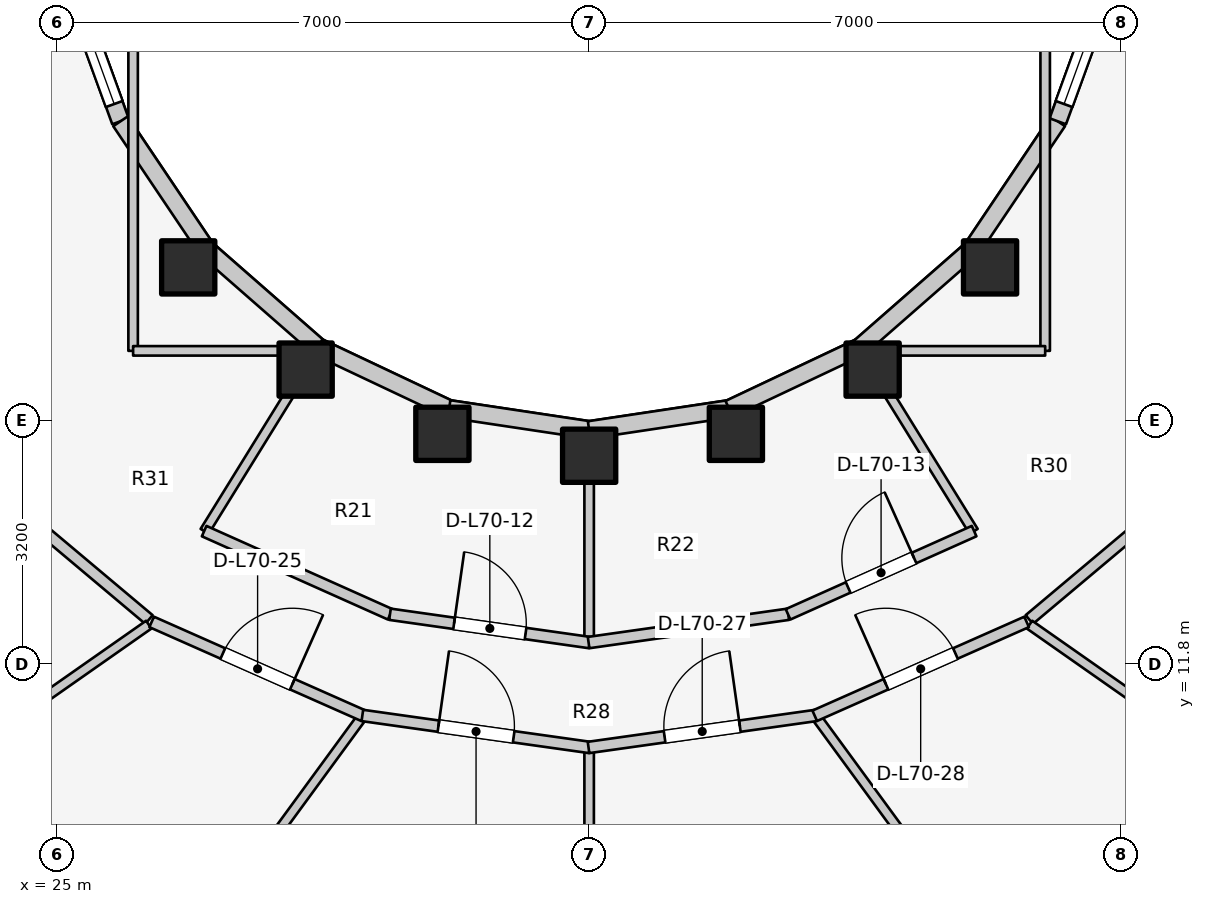
"""IFC4 building model, lengths in metres.
Left out: names, types, materials, properties, quantities, classifications, styles, units other than length and angle.
Written with IfcOpenShell. Run it as: python <this file> out.ifc"""

import sys

from ifc_helpers import new_model, si_unit, direction, frame, frame_2d, origin, origin_2d, place, context, subcontext, project, spatial, rectangle, extrude, element, fill, save


model = new_model("IFC4")
c1 = context("Model", 3, precision=1e-05, world=origin(), true_north=direction((0.0, 1.0)))
c2 = subcontext(c1, "Body", "Model", "MODEL_VIEW")
j1 = project(units=[si_unit("LENGTHUNIT", "METRE"), si_unit("PLANEANGLEUNIT", "RADIAN")], contexts=[c1])
p1 = place(None, origin())
s1 = spatial("IfcSite", under=j1, at=p1, CompositionType="ELEMENT")
p2 = place(p1, origin())
s2 = spatial("IfcBuilding", under=s1, at=p2, CompositionType="ELEMENT")
p3 = place(p2, frame((0.0, 0.0, 229.5)))
s3 = spatial("IfcBuildingStorey", under=s2, at=p3, CompositionType="ELEMENT", Elevation=229.5)
for number, where, z_axis, x_axis in (
    (1, (26.725, 17.018, 0.0), (0.0, 0.0, 1.0), (1.0, 0.0, 0.0)),
    (2, (28.27, 15.673, 0.0), (0.0, 0.0, 1.0), (1.0, 0.0, 0.0)),
    (3, (30.069, 14.828, 0.0), (0.0, 0.0, 1.0), (1.0, 0.0, 0.0)),
    (4, (32.0, 14.54, 0.0), (0.0, 0.0, 1.0), (1.0, 0.0, 0.0)),
    (5, (33.931, 14.828, 0.0), (0.0, 0.0, 1.0), (1.0, 0.0, 0.0)),
    (6, (35.73, 15.673, 0.0), (0.0, 0.0, 1.0), (1.0, 0.0, 0.0)),
    (7, (37.275, 17.018, 0.0), (0.0, 0.0, 1.0), (1.0, 0.0, 0.0)),
):
    element("IfcColumn", number, at=place(p3, frame(where, z_axis=z_axis, x_axis=x_axis)), inside=s3, PredefinedType="COLUMN", context=c2, shape_type="SweptSolid", body=[
        extrude(rectangle(XDim=0.7, YDim=0.7, at=origin_2d()), origin(), (0.0, 0.0, 1.0), 3.1),
    ])
p4 = place(p3, frame((25.123, 20.898, 0.0), z_axis=(0.0, 0.0, 1.0), x_axis=(0.341423187295, -0.93990968033, 0.0)))
e8 = element("IfcWall", 8, at=p4, inside=s3, PredefinedType="STANDARD", context=c2, shape_type="SweptSolid", body=[
    extrude(rectangle(XDim=2.084, YDim=0.23, at=frame_2d((1.042, 0.0))), origin(), (0.0, 0.0, 1.0), 2.84),
])
p5 = place(p4, frame((0.242, 0.0, 0.85)))
e9 = element("IfcOpeningElement", 9, at=p5, cuts=e8, PredefinedType="OPENING", context=c2, shape_type="SweptSolid", body=[
    extrude(rectangle(XDim=1.6, YDim=1.65, at=frame_2d((0.8, 0.825))), frame((0.0, 0.125, 0.0), z_axis=(0.0, -1.0, 0.0), x_axis=(1.0, 0.0, 0.0)), (0.0, 0.0, 1.0), 0.25),
])
p6 = place(p3, frame((25.834, 18.94, 0.0), z_axis=(0.0, 0.0, 1.0), x_axis=(0.558197800898, -0.829707909492, 0.0)))
e10 = element("IfcWall", 10, at=p6, inside=s3, PredefinedType="STANDARD", context=c2, shape_type="SweptSolid", body=[
    extrude(rectangle(XDim=2.027, YDim=0.23, at=frame_2d((1.013, 0.0))), origin(), (0.0, 0.0, 1.0), 2.16),
])
p7 = place(p3, frame((26.965, 17.258, 0.0), z_axis=(0.0, 0.0, 1.0), x_axis=(0.752576694707, -0.658504607869, 0.0)))
e11 = element("IfcWall", 11, at=p7, inside=s3, PredefinedType="STANDARD", context=c2, shape_type="SweptSolid", body=[
    extrude(rectangle(XDim=1.959, YDim=0.23, at=frame_2d((0.98, 0.0))), origin(), (0.0, 0.0, 1.0), 2.16),
])
p8 = place(p3, frame((28.44, 15.968, 0.0), z_axis=(0.0, 0.0, 1.0), x_axis=(0.904179699603, -0.427152280606, 0.0)))
e12 = element("IfcWall", 12, at=p8, inside=s3, PredefinedType="STANDARD", context=c2, shape_type="SweptSolid", body=[
    extrude(rectangle(XDim=1.899, YDim=0.23, at=frame_2d((0.95, 0.0))), origin(), (0.0, 0.0, 1.0), 2.16),
])
for number, where, z_axis, x_axis in (
    (13, (30.157, 15.157, 0.0), (0.0, 0.0, 1.0), (0.989, -0.149, 0.0)),
    (14, (32.0, 14.88, 0.0), (0.0, 0.0, 1.0), (0.989, 0.149, 0.0)),
):
    element("IfcWall", number, at=place(p3, frame(where, z_axis=z_axis, x_axis=x_axis)), inside=s3, PredefinedType="STANDARD", context=c2, shape_type="SweptSolid", body=[
        extrude(rectangle(XDim=1.864, YDim=0.23, at=frame_2d((0.932, 0.0))), origin(), (0.0, 0.0, 1.0), 2.16),
    ])
p9 = place(p3, frame((33.843, 15.157, 0.0), z_axis=(0.0, 0.0, 1.0), x_axis=(0.904179699603, 0.427152280606, 0.0)))
e15 = element("IfcWall", 15, at=p9, inside=s3, PredefinedType="STANDARD", context=c2, shape_type="SweptSolid", body=[
    extrude(rectangle(XDim=1.899, YDim=0.23, at=frame_2d((0.95, 0.0))), origin(), (0.0, 0.0, 1.0), 2.16),
])
p10 = place(p3, frame((35.56, 15.968, 0.0), z_axis=(0.0, 0.0, 1.0), x_axis=(0.752576694707, 0.658504607869, 0.0)))
e16 = element("IfcWall", 16, at=p10, inside=s3, PredefinedType="STANDARD", context=c2, shape_type="SweptSolid", body=[
    extrude(rectangle(XDim=1.959, YDim=0.23, at=frame_2d((0.98, 0.0))), origin(), (0.0, 0.0, 1.0), 2.16),
])
p11 = place(p3, frame((37.035, 17.258, 0.0), z_axis=(0.0, 0.0, 1.0), x_axis=(0.558197800898, 0.829707909492, 0.0)))
e17 = element("IfcWall", 17, at=p11, inside=s3, PredefinedType="STANDARD", context=c2, shape_type="SweptSolid", body=[
    extrude(rectangle(XDim=2.027, YDim=0.23, at=frame_2d((1.013, 0.0))), origin(), (0.0, 0.0, 1.0), 2.16),
])
p12 = place(p3, frame((38.166, 18.94, 0.0), z_axis=(0.0, 0.0, 1.0), x_axis=(0.341423187295, 0.93990968033, 0.0)))
e18 = element("IfcWall", 18, at=p12, inside=s3, PredefinedType="STANDARD", context=c2, shape_type="SweptSolid", body=[
    extrude(rectangle(XDim=2.084, YDim=0.23, at=frame_2d((1.042, 0.0))), origin(), (0.0, 0.0, 1.0), 2.84),
])
p13 = place(p12, frame((0.242, 0.0, 0.85)))
e19 = element("IfcOpeningElement", 19, at=p13, cuts=e18, PredefinedType="OPENING", context=c2, shape_type="SweptSolid", body=[
    extrude(rectangle(XDim=1.6, YDim=1.65, at=frame_2d((0.8, 0.825))), frame((0.0, 0.125, 0.0), z_axis=(0.0, -1.0, 0.0), x_axis=(1.0, 0.0, 0.0)), (0.0, 0.0, 1.0), 0.25),
])
p14 = place(p3, frame((28.45, 15.985, 0.0), z_axis=(0.0, 0.0, 1.0), x_axis=(-0.52592395012, -0.850531597702, 0.0)))
e20 = element("IfcWall", 20, at=p14, inside=s3, PredefinedType="PARTITIONING", context=c2, shape_type="SweptSolid", body=[
    extrude(rectangle(XDim=2.869, YDim=0.125, at=frame_2d((1.435, 0.0))), origin(), (0.0, 0.0, 1.0), 2.376),
])
p15 = place(p3, frame((32.0, 14.9, 0.0), z_axis=(0.0, 0.0, 1.0), x_axis=(0.0, -1.0, 0.0)))
e21 = element("IfcWall", 21, at=p15, inside=s3, PredefinedType="PARTITIONING", context=c2, shape_type="SweptSolid", body=[
    extrude(rectangle(XDim=2.818, YDim=0.125, at=frame_2d((1.409, 0.0))), origin(), (0.0, 0.0, 1.0), 2.376),
])
p16 = place(p3, frame((35.55, 15.985, 0.0), z_axis=(0.0, 0.0, 1.0), x_axis=(0.52592395012, -0.850531597702, 0.0)))
e22 = element("IfcWall", 22, at=p16, inside=s3, PredefinedType="PARTITIONING", context=c2, shape_type="SweptSolid", body=[
    extrude(rectangle(XDim=2.869, YDim=0.125, at=frame_2d((1.435, 0.0))), origin(), (0.0, 0.0, 1.0), 2.376),
])
p17 = place(p3, frame((26.935, 13.549, 0.0), z_axis=(0.0, 0.0, 1.0), x_axis=(0.912859324183, -0.408274239027, 0.0)))
e23 = element("IfcWall", 23, at=p17, inside=s3, PredefinedType="PARTITIONING", context=c2, shape_type="SweptSolid", body=[
    extrude(rectangle(XDim=2.682, YDim=0.15, at=frame_2d((1.341, 0.0))), origin(), (0.0, 0.0, 1.0), 2.376),
])
p18 = place(p3, frame((29.38, 12.455, 0.0), z_axis=(0.0, 0.0, 1.0), x_axis=(0.990096156252, -0.140390887794, 0.0)))
e24 = element("IfcWall", 24, at=p18, inside=s3, PredefinedType="PARTITIONING", context=c2, shape_type="SweptSolid", body=[
    extrude(rectangle(XDim=2.654, YDim=0.15, at=frame_2d((1.327, 0.0))), origin(), (0.0, 0.0, 1.0), 2.376),
])
p19 = place(p18, frame((0.852, 0.0, 0.0)))
e25 = element("IfcOpeningElement", 25, at=p19, cuts=e24, PredefinedType="OPENING", context=c2, shape_type="SweptSolid", body=[
    extrude(rectangle(XDim=0.95, YDim=2.1, at=frame_2d((0.475, 1.05))), frame((0.0, 0.085, 0.0), z_axis=(0.0, -1.0, 0.0), x_axis=(1.0, 0.0, 0.0)), (0.0, 0.0, 1.0), 0.17),
])
p20 = place(p3, frame((31.993, 12.082, 0.0), z_axis=(0.0, 0.0, 1.0), x_axis=(0.990096156252, 0.140390887794, 0.0)))
e26 = element("IfcWall", 26, at=p20, inside=s3, PredefinedType="PARTITIONING", context=c2, shape_type="SweptSolid", body=[
    extrude(rectangle(XDim=2.654, YDim=0.15, at=frame_2d((1.327, 0.0))), origin(), (0.0, 0.0, 1.0), 2.376),
])
p21 = place(p3, frame((34.617, 12.454, 0.0), z_axis=(0.0, 0.0, 1.0), x_axis=(0.912859324183, 0.408274239027, 0.0)))
e27 = element("IfcWall", 27, at=p21, inside=s3, PredefinedType="PARTITIONING", context=c2, shape_type="SweptSolid", body=[
    extrude(rectangle(XDim=2.682, YDim=0.15, at=frame_2d((1.341, 0.0))), origin(), (0.0, 0.0, 1.0), 2.376),
])
p22 = place(p21, frame((0.866, 0.0, 0.0)))
e28 = element("IfcOpeningElement", 28, at=p22, cuts=e27, PredefinedType="OPENING", context=c2, shape_type="SweptSolid", body=[
    extrude(rectangle(XDim=0.95, YDim=2.1, at=frame_2d((0.475, 1.05))), frame((0.0, 0.085, 0.0), z_axis=(0.0, -1.0, 0.0), x_axis=(1.0, 0.0, 0.0)), (0.0, 0.0, 1.0), 0.17),
])
p23 = place(p3, frame((26.0, 15.92, 0.0), z_axis=(0.0, 0.0, 1.0), x_axis=(0.0, 1.0, 0.0)))
e29 = element("IfcWall", 29, at=p23, inside=s3, PredefinedType="PARTITIONING", context=c2, shape_type="SweptSolid", body=[
    extrude(rectangle(XDim=4.28, YDim=0.125, at=frame_2d((2.14, 0.0))), origin(), (0.0, 0.0, 1.0), 2.232),
])
p24 = place(p3, frame((26.0, 15.92, 0.0), z_axis=(0.0, 0.0, 1.0), x_axis=(1.0, 0.0, 0.0)))
e30 = element("IfcWall", 30, at=p24, inside=s3, PredefinedType="PARTITIONING", context=c2, shape_type="SweptSolid", body=[
    extrude(rectangle(XDim=2.6, YDim=0.125, at=frame_2d((1.3, 0.0))), origin(), (0.0, 0.0, 1.0), 2.232),
])
p25 = place(p3, frame((38.0, 15.92, 0.0), z_axis=(0.0, 0.0, 1.0), x_axis=(0.0, 1.0, 0.0)))
e31 = element("IfcWall", 31, at=p25, inside=s3, PredefinedType="PARTITIONING", context=c2, shape_type="SweptSolid", body=[
    extrude(rectangle(XDim=4.28, YDim=0.125, at=frame_2d((2.14, 0.0))), origin(), (0.0, 0.0, 1.0), 2.232),
])
p26 = place(p3, frame((35.4, 15.92, 0.0), z_axis=(0.0, 0.0, 1.0), x_axis=(1.0, 0.0, 0.0)))
e32 = element("IfcWall", 32, at=p26, inside=s3, PredefinedType="PARTITIONING", context=c2, shape_type="SweptSolid", body=[
    extrude(rectangle(XDim=2.6, YDim=0.125, at=frame_2d((1.3, 0.0))), origin(), (0.0, 0.0, 1.0), 2.232),
])
for number, where, z_axis, x_axis in (
    (33, (26.209, 12.385, 0.0), (0.0, 0.0, 1.0), (-0.766, 0.643, 0.0)),
    (34, (37.791, 12.385, 0.0), (0.0, 0.0, 1.0), (0.766, 0.643, 0.0)),
):
    element("IfcWall", number, at=place(p3, frame(where, z_axis=z_axis, x_axis=x_axis)), inside=s3, PredefinedType="PARTITIONING", context=c2, shape_type="SweptSolid", body=[
        extrude(rectangle(XDim=2.105, YDim=0.15, at=frame_2d((1.053, 0.0))), origin(), (0.0, 0.0, 1.0), 2.376),
    ])
p27 = place(p3, frame((26.206, 12.318, 0.0), z_axis=(0.0, 0.0, 1.0), x_axis=(-0.819017716307, -0.573768228796, 0.0)))
e35 = element("IfcWall", 35, at=p27, inside=s3, PredefinedType="PARTITIONING", context=c2, shape_type="SweptSolid", body=[
    extrude(rectangle(XDim=6.802, YDim=0.125, at=frame_2d((3.401, 0.0))), origin(), (0.0, 0.0, 1.0), 2.376),
])
p28 = place(p3, frame((28.992, 11.077, 0.0), z_axis=(0.0, 0.0, 1.0), x_axis=(-0.590771495169, -0.806838918555, 0.0)))
e36 = element("IfcWall", 36, at=p28, inside=s3, PredefinedType="PARTITIONING", context=c2, shape_type="SweptSolid", body=[
    extrude(rectangle(XDim=6.347, YDim=0.125, at=frame_2d((3.173, 0.0))), origin(), (0.0, 0.0, 1.0), 2.376),
])
p29 = place(p3, frame((32.0, 10.647, 0.0), z_axis=(0.0, 0.0, 1.0), x_axis=(0.0, -1.0, 0.0)))
e37 = element("IfcWall", 37, at=p29, inside=s3, PredefinedType="PARTITIONING", context=c2, shape_type="SweptSolid", body=[
    extrude(rectangle(XDim=5.547, YDim=0.125, at=frame_2d((2.773, 0.0))), origin(), (0.0, 0.0, 1.0), 2.376),
])
p30 = place(p3, frame((35.008, 11.077, 0.0), z_axis=(0.0, 0.0, 1.0), x_axis=(0.590771495169, -0.806838918555, 0.0)))
e38 = element("IfcWall", 38, at=p30, inside=s3, PredefinedType="PARTITIONING", context=c2, shape_type="SweptSolid", body=[
    extrude(rectangle(XDim=6.347, YDim=0.125, at=frame_2d((3.173, 0.0))), origin(), (0.0, 0.0, 1.0), 2.376),
])
p31 = place(p3, frame((37.794, 12.318, 0.0), z_axis=(0.0, 0.0, 1.0), x_axis=(0.819017716307, -0.573768228796, 0.0)))
e39 = element("IfcWall", 39, at=p31, inside=s3, PredefinedType="PARTITIONING", context=c2, shape_type="SweptSolid", body=[
    extrude(rectangle(XDim=6.802, YDim=0.125, at=frame_2d((3.401, 0.0))), origin(), (0.0, 0.0, 1.0), 2.376),
])
p32 = place(p3, frame((26.244, 12.354, 0.0), z_axis=(0.0, 0.0, 1.0), x_axis=(0.914302802833, -0.405031337963, 0.0)))
e40 = element("IfcWall", 40, at=p32, inside=s3, PredefinedType="PARTITIONING", context=c2, shape_type="SweptSolid", body=[
    extrude(rectangle(XDim=3.049, YDim=0.15, at=frame_2d((1.525, 0.0))), origin(), (0.0, 0.0, 1.0), 2.376),
])
p33 = place(p32, frame((1.025, 0.0, 0.0)))
e41 = element("IfcOpeningElement", 41, at=p33, cuts=e40, PredefinedType="OPENING", context=c2, shape_type="SweptSolid", body=[
    extrude(rectangle(XDim=1.0, YDim=2.1, at=frame_2d((0.5, 1.05))), frame((0.0, 0.085, 0.0), z_axis=(0.0, -1.0, 0.0), x_axis=(1.0, 0.0, 0.0)), (0.0, 0.0, 1.0), 0.17),
])
p34 = place(p3, frame((29.016, 11.123, 0.0), z_axis=(0.0, 0.0, 1.0), x_axis=(0.990225561979, -0.139475217886, 0.0)))
e42 = element("IfcWall", 42, at=p34, inside=s3, PredefinedType="PARTITIONING", context=c2, shape_type="SweptSolid", body=[
    extrude(rectangle(XDim=3.021, YDim=0.15, at=frame_2d((1.511, 0.0))), origin(), (0.0, 0.0, 1.0), 2.376),
])
p35 = place(p34, frame((1.01, 0.0, 0.0)))
e43 = element("IfcOpeningElement", 43, at=p35, cuts=e42, PredefinedType="OPENING", context=c2, shape_type="SweptSolid", body=[
    extrude(rectangle(XDim=1.0, YDim=2.1, at=frame_2d((0.5, 1.05))), frame((0.0, 0.085, 0.0), z_axis=(0.0, -1.0, 0.0), x_axis=(1.0, 0.0, 0.0)), (0.0, 0.0, 1.0), 0.17),
])
p36 = place(p3, frame((31.992, 10.702, 0.0), z_axis=(0.0, 0.0, 1.0), x_axis=(0.990225561979, 0.139475217886, 0.0)))
e44 = element("IfcWall", 44, at=p36, inside=s3, PredefinedType="PARTITIONING", context=c2, shape_type="SweptSolid", body=[
    extrude(rectangle(XDim=3.021, YDim=0.15, at=frame_2d((1.511, 0.0))), origin(), (0.0, 0.0, 1.0), 2.376),
])
p37 = place(p36, frame((1.01, 0.0, 0.0)))
e45 = element("IfcOpeningElement", 45, at=p37, cuts=e44, PredefinedType="OPENING", context=c2, shape_type="SweptSolid", body=[
    extrude(rectangle(XDim=1.0, YDim=2.1, at=frame_2d((0.5, 1.05))), frame((0.0, 0.085, 0.0), z_axis=(0.0, -1.0, 0.0), x_axis=(1.0, 0.0, 0.0)), (0.0, 0.0, 1.0), 0.17),
])
p38 = place(p3, frame((34.968, 11.119, 0.0), z_axis=(0.0, 0.0, 1.0), x_axis=(0.914302802833, 0.405031337963, 0.0)))
e46 = element("IfcWall", 46, at=p38, inside=s3, PredefinedType="PARTITIONING", context=c2, shape_type="SweptSolid", body=[
    extrude(rectangle(XDim=3.049, YDim=0.15, at=frame_2d((1.525, 0.0))), origin(), (0.0, 0.0, 1.0), 2.376),
])
p39 = place(p38, frame((1.025, 0.0, 0.0)))
e47 = element("IfcOpeningElement", 47, at=p39, cuts=e46, PredefinedType="OPENING", context=c2, shape_type="SweptSolid", body=[
    extrude(rectangle(XDim=1.0, YDim=2.1, at=frame_2d((0.5, 1.05))), frame((0.0, 0.085, 0.0), z_axis=(0.0, -1.0, 0.0), x_axis=(1.0, 0.0, 0.0)), (0.0, 0.0, 1.0), 0.17),
])
p40 = place(p5, origin())
e48 = element("IfcWindow", 48, at=p40, inside=s3, PartitioningType="SINGLE_PANEL", PredefinedType="WINDOW", context=c2, shape_type="SweptSolid", body=[
    extrude(rectangle(XDim=1.6, YDim=1.65, at=frame_2d((0.8, 0.825))), frame((0.0, 0.03, 0.0), z_axis=(0.0, -1.0, 0.0), x_axis=(1.0, 0.0, 0.0)), (0.0, 0.0, 1.0), 0.06),
])
fill(e9, e48)
p41 = place(p13, origin())
e49 = element("IfcWindow", 49, at=p41, inside=s3, PartitioningType="SINGLE_PANEL", PredefinedType="WINDOW", context=c2, shape_type="SweptSolid", body=[
    extrude(rectangle(XDim=1.6, YDim=1.65, at=frame_2d((0.8, 0.825))), frame((0.0, 0.03, 0.0), z_axis=(0.0, -1.0, 0.0), x_axis=(1.0, 0.0, 0.0)), (0.0, 0.0, 1.0), 0.06),
])
fill(e19, e49)
p42 = place(p19, origin())
e50 = element("IfcDoor", 50, at=p42, inside=s3, OperationType="SINGLE_SWING_LEFT", PredefinedType="DOOR", context=c2, shape_type="SweptSolid", body=[
    extrude(rectangle(XDim=0.95, YDim=2.1, at=frame_2d((0.475, 1.05))), frame((0.0, 0.025, 0.0), z_axis=(0.0, -1.0, 0.0), x_axis=(1.0, 0.0, 0.0)), (0.0, 0.0, 1.0), 0.05),
])
fill(e25, e50)
p43 = place(p22, origin())
e51 = element("IfcDoor", 51, at=p43, inside=s3, OperationType="SINGLE_SWING_RIGHT", PredefinedType="DOOR", context=c2, shape_type="SweptSolid", body=[
    extrude(rectangle(XDim=0.95, YDim=2.1, at=frame_2d((0.475, 1.05))), frame((0.0, 0.025, 0.0), z_axis=(0.0, -1.0, 0.0), x_axis=(1.0, 0.0, 0.0)), (0.0, 0.0, 1.0), 0.05),
])
fill(e28, e51)
p44 = place(p33, origin())
e52 = element("IfcDoor", 52, at=p44, inside=s3, OperationType="SINGLE_SWING_RIGHT", PredefinedType="DOOR", context=c2, shape_type="SweptSolid", body=[
    extrude(rectangle(XDim=1.0, YDim=2.1, at=frame_2d((0.5, 1.05))), frame((0.0, 0.025, 0.0), z_axis=(0.0, -1.0, 0.0), x_axis=(1.0, 0.0, 0.0)), (0.0, 0.0, 1.0), 0.05),
])
fill(e41, e52)
p45 = place(p35, origin())
e53 = element("IfcDoor", 53, at=p45, inside=s3, OperationType="SINGLE_SWING_LEFT", PredefinedType="DOOR", context=c2, shape_type="SweptSolid", body=[
    extrude(rectangle(XDim=1.0, YDim=2.1, at=frame_2d((0.5, 1.05))), frame((0.0, 0.025, 0.0), z_axis=(0.0, -1.0, 0.0), x_axis=(1.0, 0.0, 0.0)), (0.0, 0.0, 1.0), 0.05),
])
fill(e43, e53)
p46 = place(p37, origin())
e54 = element("IfcDoor", 54, at=p46, inside=s3, OperationType="SINGLE_SWING_RIGHT", PredefinedType="DOOR", context=c2, shape_type="SweptSolid", body=[
    extrude(rectangle(XDim=1.0, YDim=2.1, at=frame_2d((0.5, 1.05))), frame((0.0, 0.025, 0.0), z_axis=(0.0, -1.0, 0.0), x_axis=(1.0, 0.0, 0.0)), (0.0, 0.0, 1.0), 0.05),
])
fill(e45, e54)
p47 = place(p39, origin())
e55 = element("IfcDoor", 55, at=p47, inside=s3, OperationType="SINGLE_SWING_LEFT", PredefinedType="DOOR", context=c2, shape_type="SweptSolid", body=[
    extrude(rectangle(XDim=1.0, YDim=2.1, at=frame_2d((0.5, 1.05))), frame((0.0, 0.025, 0.0), z_axis=(0.0, -1.0, 0.0), x_axis=(1.0, 0.0, 0.0)), (0.0, 0.0, 1.0), 0.05),
])
fill(e47, e55)
save(model, sys.argv[1])
